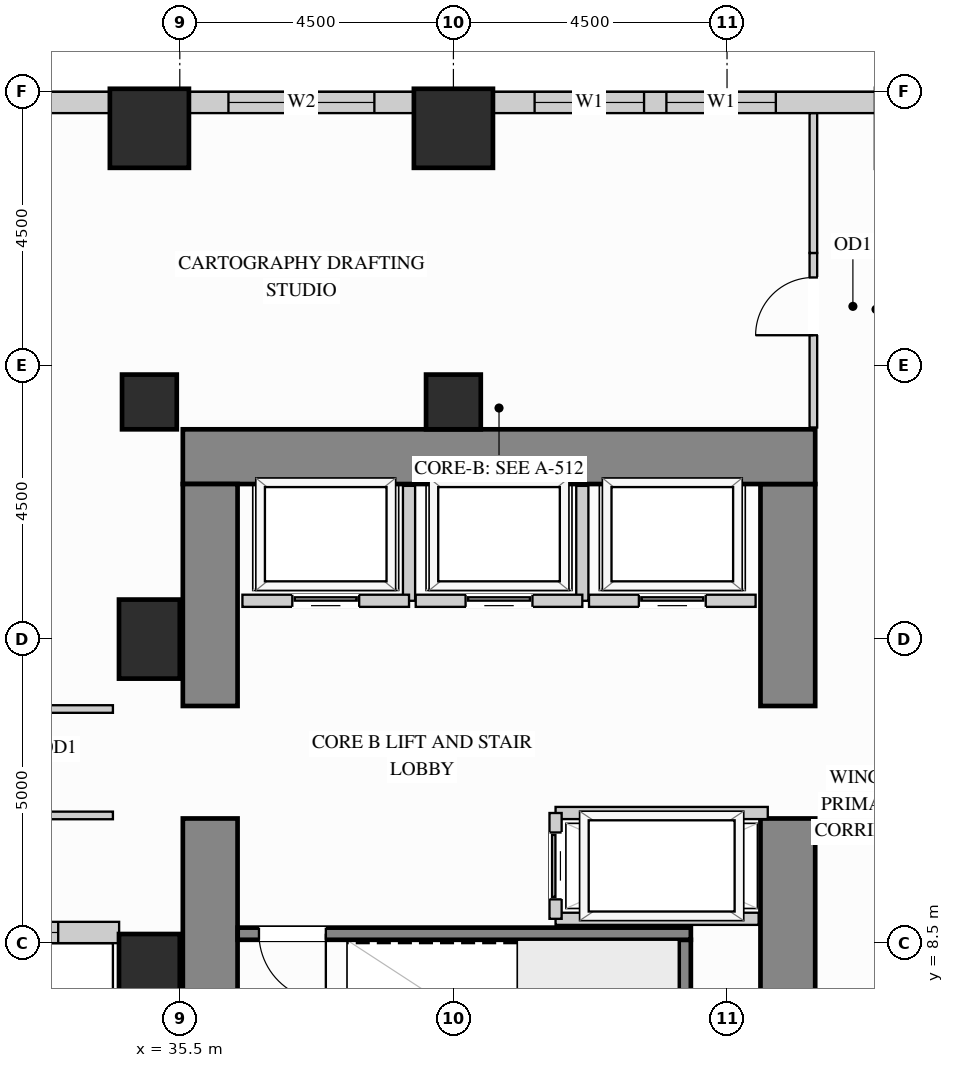
"""IFC4 building model, lengths in metres.
Left out: names, types, materials, properties, quantities, classifications, styles, units other than length and angle.
Written with IfcOpenShell. Run it as: python <this file> out.ifc"""

import sys

from ifc_helpers import new_model, si_unit, direction, frame, frame_2d, origin, origin_2d, place, context, subcontext, project, spatial, rectangle, extrude, source, transform, mapped, element, fill, save


model = new_model("IFC4")
c1 = context("Model", 3, precision=1e-05, world=origin(), true_north=direction((0.0, 1.0)))
c2 = subcontext(c1, "Body", "Model", "MODEL_VIEW")
j1 = project(units=[si_unit("LENGTHUNIT", "METRE"), si_unit("PLANEANGLEUNIT", "RADIAN")], contexts=[c1])
p1 = place(None, origin())
s1 = spatial("IfcSite", under=j1, at=p1, CompositionType="ELEMENT")
p2 = place(p1, origin())
s2 = spatial("IfcBuilding", under=s1, at=p2, CompositionType="ELEMENT")
p3 = place(p2, frame((0.0, 0.0, 26.1)))
s3 = spatial("IfcBuildingStorey", under=s2, at=p3, CompositionType="ELEMENT", Elevation=26.1)
m1 = source(origin(), c2, "Body", "SweptSolid", [
    extrude(rectangle(XDim=0.9, YDim=0.9, at=origin_2d()), origin(), (0.0, 0.0, 1.0), 3.38),
])
for number, where, z_axis, x_axis in (
    (1, (35.0, 17.4, 0.0), (0.0, 0.0, 1.0), (1.0, 0.0, 0.0)),
    (2, (40.0, 17.4, 0.0), (0.0, 0.0, 1.0), (1.0, 0.0, 0.0)),
):
    element("IfcColumn", number, at=place(p3, frame(where, z_axis=z_axis, x_axis=x_axis)), inside=s3, PredefinedType="COLUMN", context=c2, shape_type="MappedRepresentation", body=[
        mapped(m1, transform((0.0, 0.0, 0.0), x_axis=(1.0, 0.0, 0.0), y_axis=(0.0, 1.0, 0.0), z_axis=(0.0, 0.0, 1.0))),
    ])
m2 = source(origin(), c2, "Body", "SweptSolid", [
    extrude(rectangle(XDim=1.0, YDim=1.3, at=origin_2d()), origin(), (0.0, 0.0, 1.0), 3.38),
])
for number, where, z_axis, x_axis in (
    (3, (35.0, 13.5, 0.0), (0.0, 0.0, 1.0), (1.0, 0.0, 0.0)),
    (4, (35.0, 8.0, 0.0), (0.0, 0.0, 1.0), (1.0, 0.0, 0.0)),
):
    element("IfcColumn", number, at=place(p3, frame(where, z_axis=z_axis, x_axis=x_axis)), inside=s3, PredefinedType="COLUMN", context=c2, shape_type="MappedRepresentation", body=[
        mapped(m2, transform((0.0, 0.0, 0.0), x_axis=(1.0, 0.0, 0.0), y_axis=(0.0, 1.0, 0.0), z_axis=(0.0, 0.0, 1.0))),
    ])
m3 = source(origin(), c2, "Body", "SweptSolid", [
    extrude(rectangle(XDim=1.3, YDim=1.3, at=origin_2d()), origin(), (0.0, 0.0, 1.0), 3.38),
])
for number, where, z_axis, x_axis in (
    (5, (35.0, 21.9, 0.0), (0.0, 0.0, 1.0), (1.0, 0.0, 0.0)),
    (6, (40.0, 21.9, 0.0), (0.0, 0.0, 1.0), (1.0, 0.0, 0.0)),
):
    element("IfcColumn", number, at=place(p3, frame(where, z_axis=z_axis, x_axis=x_axis)), inside=s3, PredefinedType="COLUMN", context=c2, shape_type="MappedRepresentation", body=[
        mapped(m3, transform((0.0, 0.0, 0.0), x_axis=(1.0, 0.0, 0.0), y_axis=(0.0, 1.0, 0.0), z_axis=(0.0, 0.0, 1.0))),
    ])
m4 = source(origin(), c2, "Body", "SweptSolid", [
    extrude(rectangle(XDim=5.6, YDim=0.9, at=frame_2d((2.8, 0.0))), origin(), (0.0, 0.0, 1.0), 3.38),
])
p4 = place(p3, frame((45.5, 4.95, 0.0), z_axis=(0.0, 0.0, 1.0), x_axis=(0.0, 1.0, 0.0)))
e7 = element("IfcWall", 7, at=p4, inside=s3, PredefinedType="SHEAR", context=c2, shape_type="MappedRepresentation", body=[
    mapped(m4, transform((0.0, 0.0, 0.0), x_axis=(1.0, 0.0, 0.0), y_axis=(0.0, 1.0, 0.0), z_axis=(0.0, 0.0, 1.0))),
])
m5 = source(origin(), c2, "Body", "SweptSolid", [
    extrude(rectangle(XDim=3.65, YDim=0.9, at=frame_2d((1.825, 0.0))), origin(), (0.0, 0.0, 1.0), 3.38),
])
p5 = place(p3, frame((45.5, 12.4, 0.0), z_axis=(0.0, 0.0, 1.0), x_axis=(0.0, 1.0, 0.0)))
e8 = element("IfcWall", 8, at=p5, inside=s3, PredefinedType="SHEAR", context=c2, shape_type="MappedRepresentation", body=[
    mapped(m5, transform((0.0, 0.0, 0.0), x_axis=(1.0, 0.0, 0.0), y_axis=(0.0, 1.0, 0.0), z_axis=(0.0, 0.0, 1.0))),
])
m6 = source(origin(), c2, "Body", "SweptSolid", [
    extrude(rectangle(XDim=10.4, YDim=0.9, at=frame_2d((5.2, 0.0))), origin(), (0.0, 0.0, 1.0), 3.38),
])
p6 = place(p3, frame((35.55, 16.5, 0.0), z_axis=(0.0, 0.0, 1.0), x_axis=(1.0, 0.0, 0.0)))
e9 = element("IfcWall", 9, at=p6, inside=s3, PredefinedType="SHEAR", context=c2, shape_type="MappedRepresentation", body=[
    mapped(m6, transform((0.0, 0.0, 0.0), x_axis=(1.0, 0.0, 0.0), y_axis=(0.0, 1.0, 0.0), z_axis=(0.0, 0.0, 1.0))),
])
p7 = place(p3, frame((36.0, 4.95, 0.0), z_axis=(0.0, 0.0, 1.0), x_axis=(0.0, 1.0, 0.0)))
e10 = element("IfcWall", 10, at=p7, inside=s3, PredefinedType="SHEAR", context=c2, shape_type="MappedRepresentation", body=[
    mapped(m4, transform((0.0, 0.0, 0.0), x_axis=(1.0, 0.0, 0.0), y_axis=(0.0, 1.0, 0.0), z_axis=(0.0, 0.0, 1.0))),
])
p8 = place(p3, frame((36.0, 12.4, 0.0), z_axis=(0.0, 0.0, 1.0), x_axis=(0.0, 1.0, 0.0)))
e11 = element("IfcWall", 11, at=p8, inside=s3, PredefinedType="SHEAR", context=c2, shape_type="MappedRepresentation", body=[
    mapped(m5, transform((0.0, 0.0, 0.0), x_axis=(1.0, 0.0, 0.0), y_axis=(0.0, 1.0, 0.0), z_axis=(0.0, 0.0, 1.0))),
])
p9 = place(p3, frame((30.998, 8.675, 0.0), z_axis=(0.0, 0.0, 1.0), x_axis=(1.0, 0.0, 0.0)))
e12 = element("IfcWall", 12, at=p9, inside=s3, PredefinedType="SOLIDWALL", context=c2, shape_type="SweptSolid", body=[
    extrude(rectangle(XDim=3.504, YDim=0.35, at=frame_2d((1.752, 0.0))), origin(), (0.0, 0.0, 1.0), 3.365),
])
p10 = place(p9, frame((1.002, 0.0, 0.78)))
e13 = element("IfcOpeningElement", 13, at=p10, cuts=e12, PredefinedType="OPENING", context=c2, shape_type="SweptSolid", body=[
    extrude(rectangle(XDim=1.5, YDim=2.0, at=frame_2d((0.75, 1.0))), frame((0.0, 0.185, 0.0), z_axis=(0.0, -1.0, 0.0), x_axis=(1.0, 0.0, 0.0)), (0.0, 0.0, 1.0), 0.37),
])
p11 = place(p3, frame((46.952, 22.325, 0.0), z_axis=(0.0, 0.0, 1.0), x_axis=(-1.0, 0.0, 0.0)))
e14 = element("IfcWall", 14, at=p11, inside=s3, PredefinedType="SOLIDWALL", context=c2, shape_type="SweptSolid", body=[
    extrude(rectangle(XDim=6.304, YDim=0.35, at=frame_2d((3.152, 0.0))), origin(), (0.0, 0.0, 1.0), 2.51),
])
p12 = place(p11, frame((1.649, 0.0, 0.78)))
e15 = element("IfcOpeningElement", 15, at=p12, cuts=e14, PredefinedType="OPENING", context=c2, shape_type="SweptSolid", body=[
    extrude(rectangle(XDim=1.8, YDim=1.55, at=frame_2d((0.9, 0.775))), frame((0.0, 0.185, 0.0), z_axis=(0.0, -1.0, 0.0), x_axis=(1.0, 0.0, 0.0)), (0.0, 0.0, 1.0), 0.37),
])
p13 = place(p11, frame((3.817, 0.0, 0.78)))
e16 = element("IfcOpeningElement", 16, at=p13, cuts=e14, PredefinedType="OPENING", context=c2, shape_type="SweptSolid", body=[
    extrude(rectangle(XDim=1.8, YDim=1.55, at=frame_2d((0.9, 0.775))), frame((0.0, 0.185, 0.0), z_axis=(0.0, -1.0, 0.0), x_axis=(1.0, 0.0, 0.0)), (0.0, 0.0, 1.0), 0.37),
])
p14 = place(p3, frame((39.352, 22.325, 0.0), z_axis=(0.0, 0.0, 1.0), x_axis=(-1.0, 0.0, 0.0)))
e17 = element("IfcWall", 17, at=p14, inside=s3, PredefinedType="SOLIDWALL", context=c2, shape_type="SweptSolid", body=[
    extrude(rectangle(XDim=3.704, YDim=0.35, at=frame_2d((1.852, 0.0))), origin(), (0.0, 0.0, 1.0), 2.51),
])
p15 = place(p14, frame((0.652, 0.0, 0.78)))
e18 = element("IfcOpeningElement", 18, at=p15, cuts=e17, PredefinedType="OPENING", context=c2, shape_type="SweptSolid", body=[
    extrude(rectangle(XDim=2.4, YDim=1.55, at=frame_2d((1.2, 0.775))), frame((0.0, 0.185, 0.0), z_axis=(0.0, -1.0, 0.0), x_axis=(1.0, 0.0, 0.0)), (0.0, 0.0, 1.0), 0.37),
])
p16 = place(p3, frame((34.352, 22.325, 0.0), z_axis=(0.0, 0.0, 1.0), x_axis=(-1.0, 0.0, 0.0)))
e19 = element("IfcWall", 19, at=p16, inside=s3, PredefinedType="SOLIDWALL", context=c2, shape_type="SweptSolid", body=[
    extrude(rectangle(XDim=14.854, YDim=0.35, at=frame_2d((7.427, 0.0))), origin(), (0.0, 0.0, 1.0), 3.365),
])
p17 = place(p16, frame((4.058, 0.0, 0.78)))
e20 = element("IfcOpeningElement", 20, at=p17, cuts=e19, PredefinedType="OPENING", context=c2, shape_type="SweptSolid", body=[
    extrude(rectangle(XDim=1.5, YDim=2.0, at=frame_2d((0.75, 1.0))), frame((0.0, 0.185, 0.0), z_axis=(0.0, -1.0, 0.0), x_axis=(1.0, 0.0, 0.0)), (0.0, 0.0, 1.0), 0.37),
])
p18 = place(p16, frame((9.296, 0.0, 0.78)))
e21 = element("IfcOpeningElement", 21, at=p18, cuts=e19, PredefinedType="OPENING", context=c2, shape_type="SweptSolid", body=[
    extrude(rectangle(XDim=1.5, YDim=2.0, at=frame_2d((0.75, 1.0))), frame((0.0, 0.185, 0.0), z_axis=(0.0, -1.0, 0.0), x_axis=(1.0, 0.0, 0.0)), (0.0, 0.0, 1.0), 0.37),
])
p19 = place(p3, frame((45.92, 16.98, 0.0), z_axis=(0.0, 0.0, 1.0), x_axis=(0.0, 1.0, 0.0)))
e22 = element("IfcWall", 22, at=p19, inside=s3, PredefinedType="PARTITIONING", context=c2, shape_type="SweptSolid", body=[
    extrude(rectangle(XDim=2.87, YDim=0.125, at=frame_2d((1.435, 0.0))), origin(), (0.0, 0.0, 1.0), 3.365),
])
p20 = place(p19, frame((1.517, 0.0, 0.0)))
e23 = element("IfcOpeningElement", 23, at=p20, cuts=e22, PredefinedType="OPENING", context=c2, shape_type="SweptSolid", body=[
    extrude(rectangle(XDim=0.95, YDim=2.15, at=frame_2d((0.475, 1.075))), frame((0.0, 0.073, 0.0), z_axis=(0.0, -1.0, 0.0), x_axis=(1.0, 0.0, 0.0)), (0.0, 0.0, 1.0), 0.145),
])
m7 = source(origin(), c2, "Body", "SweptSolid", [
    extrude(rectangle(XDim=2.298, YDim=0.125, at=frame_2d((1.149, 0.0))), origin(), (0.0, 0.0, 1.0), 3.365),
])
p21 = place(p3, frame((45.92, 19.85, 0.0), z_axis=(0.0, 0.0, 1.0), x_axis=(0.0, 1.0, 0.0)))
e24 = element("IfcWall", 24, at=p21, inside=s3, PredefinedType="PARTITIONING", context=c2, shape_type="MappedRepresentation", body=[
    mapped(m7, transform((0.0, 0.0, 0.0), x_axis=(1.0, 0.0, 0.0), y_axis=(0.0, 1.0, 0.0), z_axis=(0.0, 0.0, 1.0))),
])
p22 = place(p3, frame((29.85, 12.35, 0.0), z_axis=(0.0, 0.0, 1.0), x_axis=(1.0, 0.0, 0.0)))
e25 = element("IfcWall", 25, at=p22, inside=s3, PredefinedType="PARTITIONING", context=c2, shape_type="SweptSolid", body=[
    extrude(rectangle(XDim=4.55, YDim=0.125, at=frame_2d((2.275, 0.0))), origin(), (0.0, 0.0, 1.0), 3.365),
])
p23 = place(p22, frame((1.8, 0.0, 0.0)))
e26 = element("IfcOpeningElement", 26, at=p23, cuts=e25, PredefinedType="OPENING", context=c2, shape_type="SweptSolid", body=[
    extrude(rectangle(XDim=0.95, YDim=2.15, at=frame_2d((0.475, 1.075))), frame((0.0, 0.073, 0.0), z_axis=(0.0, -1.0, 0.0), x_axis=(1.0, 0.0, 0.0)), (0.0, 0.0, 1.0), 0.145),
])
p24 = place(p3, frame((26.95, 10.6, 0.0), z_axis=(0.0, 0.0, 1.0), x_axis=(1.0, 0.0, 0.0)))
e27 = element("IfcWall", 27, at=p24, inside=s3, PredefinedType="PARTITIONING", context=c2, shape_type="SweptSolid", body=[
    extrude(rectangle(XDim=7.45, YDim=0.125, at=frame_2d((3.725, 0.0))), origin(), (0.0, 0.0, 1.0), 3.365),
])
p25 = place(p24, frame((4.683, 0.0, 0.0)))
e28 = element("IfcOpeningElement", 28, at=p25, cuts=e27, PredefinedType="OPENING", context=c2, shape_type="SweptSolid", body=[
    extrude(rectangle(XDim=0.95, YDim=2.15, at=frame_2d((0.475, 1.075))), frame((0.0, 0.073, 0.0), z_axis=(0.0, -1.0, 0.0), x_axis=(1.0, 0.0, 0.0)), (0.0, 0.0, 1.0), 0.145),
])
m8 = source(origin(), c2, "Body", "SweptSolid", [
    extrude(rectangle(XDim=1.89, YDim=0.2, at=frame_2d((0.945, 0.0))), origin(), (0.0, 0.0, 1.0), 3.365),
])
p26 = place(p3, frame((39.27, 14.13, 0.0), z_axis=(0.0, 0.0, 1.0), x_axis=(0.0, 1.0, 0.0)))
e29 = element("IfcWall", 29, at=p26, inside=s3, PredefinedType="PARTITIONING", context=c2, shape_type="MappedRepresentation", body=[
    mapped(m8, transform((0.0, 0.0, 0.0), x_axis=(1.0, 0.0, 0.0), y_axis=(0.0, 1.0, 0.0), z_axis=(0.0, 0.0, 1.0))),
])
p27 = place(p3, frame((36.53, 14.13, 0.0), z_axis=(0.0, 0.0, 1.0), x_axis=(1.0, 0.0, 0.0)))
e30 = element("IfcWall", 30, at=p27, inside=s3, PredefinedType="PARTITIONING", context=c2, shape_type="SweptSolid", body=[
    extrude(rectangle(XDim=2.74, YDim=0.2, at=frame_2d((1.37, 0.0))), origin(), (0.0, 0.0, 1.0), 3.365),
])
p28 = place(p27, frame((0.82, 0.0, 0.0)))
e31 = element("IfcOpeningElement", 31, at=p28, cuts=e30, PredefinedType="OPENING", context=c2, shape_type="SweptSolid", body=[
    extrude(rectangle(XDim=1.1, YDim=2.2, at=frame_2d((0.55, 1.1))), frame((0.0, 0.11, 0.0), z_axis=(0.0, -1.0, 0.0), x_axis=(1.0, 0.0, 0.0)), (0.0, 0.0, 1.0), 0.22),
])
p29 = place(p3, frame((42.12, 14.13, 0.0), z_axis=(0.0, 0.0, 1.0), x_axis=(0.0, 1.0, 0.0)))
e32 = element("IfcWall", 32, at=p29, inside=s3, PredefinedType="PARTITIONING", context=c2, shape_type="MappedRepresentation", body=[
    mapped(m8, transform((0.0, 0.0, 0.0), x_axis=(1.0, 0.0, 0.0), y_axis=(0.0, 1.0, 0.0), z_axis=(0.0, 0.0, 1.0))),
])
p30 = place(p3, frame((39.38, 14.13, 0.0), z_axis=(0.0, 0.0, 1.0), x_axis=(1.0, 0.0, 0.0)))
e33 = element("IfcWall", 33, at=p30, inside=s3, PredefinedType="PARTITIONING", context=c2, shape_type="SweptSolid", body=[
    extrude(rectangle(XDim=2.74, YDim=0.2, at=frame_2d((1.37, 0.0))), origin(), (0.0, 0.0, 1.0), 3.365),
])
p31 = place(p30, frame((0.82, 0.0, 0.0)))
e34 = element("IfcOpeningElement", 34, at=p31, cuts=e33, PredefinedType="OPENING", context=c2, shape_type="SweptSolid", body=[
    extrude(rectangle(XDim=1.1, YDim=2.2, at=frame_2d((0.55, 1.1))), frame((0.0, 0.11, 0.0), z_axis=(0.0, -1.0, 0.0), x_axis=(1.0, 0.0, 0.0)), (0.0, 0.0, 1.0), 0.22),
])
p32 = place(p3, frame((42.23, 14.13, 0.0), z_axis=(0.0, 0.0, 1.0), x_axis=(1.0, 0.0, 0.0)))
e35 = element("IfcWall", 35, at=p32, inside=s3, PredefinedType="PARTITIONING", context=c2, shape_type="SweptSolid", body=[
    extrude(rectangle(XDim=2.74, YDim=0.2, at=frame_2d((1.37, 0.0))), origin(), (0.0, 0.0, 1.0), 3.365),
])
p33 = place(p32, frame((0.82, 0.0, 0.0)))
e36 = element("IfcOpeningElement", 36, at=p33, cuts=e35, PredefinedType="OPENING", context=c2, shape_type="SweptSolid", body=[
    extrude(rectangle(XDim=1.1, YDim=2.2, at=frame_2d((0.55, 1.1))), frame((0.0, 0.11, 0.0), z_axis=(0.0, -1.0, 0.0), x_axis=(1.0, 0.0, 0.0)), (0.0, 0.0, 1.0), 0.22),
])
m9 = source(origin(), c2, "Body", "SweptSolid", [
    extrude(rectangle(XDim=3.49, YDim=0.2, at=frame_2d((1.745, 0.0))), origin(), (0.0, 0.0, 1.0), 3.365),
])
p34 = place(p3, frame((41.68, 10.64, 0.0), z_axis=(0.0, 0.0, 1.0), x_axis=(1.0, 0.0, 0.0)))
e37 = element("IfcWall", 37, at=p34, inside=s3, PredefinedType="PARTITIONING", context=c2, shape_type="MappedRepresentation", body=[
    mapped(m9, transform((0.0, 0.0, 0.0), x_axis=(1.0, 0.0, 0.0), y_axis=(0.0, 1.0, 0.0), z_axis=(0.0, 0.0, 1.0))),
])
m10 = source(origin(), c2, "Body", "SweptSolid", [
    extrude(rectangle(XDim=3.34, YDim=0.2, at=frame_2d((1.67, 0.0))), origin(), (0.0, 0.0, 1.0), 3.365),
])
p35 = place(p3, frame((41.68, 8.9, 0.0), z_axis=(0.0, 0.0, 1.0), x_axis=(1.0, 0.0, 0.0)))
e38 = element("IfcWall", 38, at=p35, inside=s3, PredefinedType="PARTITIONING", context=c2, shape_type="MappedRepresentation", body=[
    mapped(m10, transform((0.0, 0.0, 0.0), x_axis=(1.0, 0.0, 0.0), y_axis=(0.0, 1.0, 0.0), z_axis=(0.0, 0.0, 1.0))),
])
p36 = place(p3, frame((41.68, 8.9, 0.0), z_axis=(0.0, 0.0, 1.0), x_axis=(0.0, 1.0, 0.0)))
e39 = element("IfcWall", 39, at=p36, inside=s3, PredefinedType="PARTITIONING", context=c2, shape_type="SweptSolid", body=[
    extrude(rectangle(XDim=1.74, YDim=0.2, at=frame_2d((0.87, 0.0))), origin(), (0.0, 0.0, 1.0), 3.365),
])
p37 = place(p36, frame((0.32, 0.0, 0.0)))
e40 = element("IfcOpeningElement", 40, at=p37, cuts=e39, PredefinedType="OPENING", context=c2, shape_type="SweptSolid", body=[
    extrude(rectangle(XDim=1.1, YDim=2.2, at=frame_2d((0.55, 1.1))), frame((0.0, 0.11, 0.0), z_axis=(0.0, -1.0, 0.0), x_axis=(1.0, 0.0, 0.0)), (0.0, 0.0, 1.0), 0.22),
])
m11 = source(origin(), c2, "Body", "SweptSolid", [
    extrude(rectangle(XDim=3.603, YDim=0.2, at=frame_2d((1.802, 0.0))), origin(), (0.0, 0.0, 1.0), 3.38),
])
p38 = place(p3, frame((43.805, 4.952, 0.0), z_axis=(0.0, 0.0, 1.0), x_axis=(0.0, 1.0, 0.0)))
e41 = element("IfcWall", 41, at=p38, inside=s3, PredefinedType="SHEAR", context=c2, shape_type="MappedRepresentation", body=[
    mapped(m11, transform((0.0, 0.0, 0.0), x_axis=(1.0, 0.0, 0.0), y_axis=(0.0, 1.0, 0.0), z_axis=(0.0, 0.0, 1.0))),
])
p39 = place(p3, frame((36.452, 8.655, 0.0), z_axis=(0.0, 0.0, 1.0), x_axis=(1.0, 0.0, 0.0)))
e42 = element("IfcWall", 42, at=p39, inside=s3, PredefinedType="SHEAR", context=c2, shape_type="SweptSolid", body=[
    extrude(rectangle(XDim=7.453, YDim=0.2, at=frame_2d((3.727, 0.0))), origin(), (0.0, 0.0, 1.0), 3.38),
])
p40 = place(p39, frame((0.35, 0.0, 0.0)))
e43 = element("IfcOpeningElement", 43, at=p40, cuts=e42, PredefinedType="OPENING", context=c2, shape_type="SweptSolid", body=[
    extrude(rectangle(XDim=1.1, YDim=2.15, at=frame_2d((0.55, 1.075))), frame((0.0, 0.11, 0.0), z_axis=(0.0, -1.0, 0.0), x_axis=(1.0, 0.0, 0.0)), (0.0, 0.0, 1.0), 0.22),
])
m12 = source(origin(), c2, "Body", "SweptSolid", [
    extrude(rectangle(XDim=1.1, YDim=2.2, at=frame_2d((0.55, 1.1))), frame((0.0, 0.025, 0.0), z_axis=(0.0, -1.0, 0.0), x_axis=(1.0, 0.0, 0.0)), (0.0, 0.0, 1.0), 0.05),
])
p41 = place(p28, origin())
e44 = element("IfcDoor", 44, at=p41, inside=s3, OperationType="SLIDING_TO_LEFT", PredefinedType="DOOR", context=c2, shape_type="MappedRepresentation", body=[
    mapped(m12, transform((0.0, 0.0, 0.0), x_axis=(1.0, 0.0, 0.0), y_axis=(0.0, 1.0, 0.0), z_axis=(0.0, 0.0, 1.0))),
])
fill(e31, e44)
p42 = place(p31, origin())
e45 = element("IfcDoor", 45, at=p42, inside=s3, OperationType="SLIDING_TO_LEFT", PredefinedType="DOOR", context=c2, shape_type="MappedRepresentation", body=[
    mapped(m12, transform((0.0, 0.0, 0.0), x_axis=(1.0, 0.0, 0.0), y_axis=(0.0, 1.0, 0.0), z_axis=(0.0, 0.0, 1.0))),
])
fill(e34, e45)
p43 = place(p33, origin())
e46 = element("IfcDoor", 46, at=p43, inside=s3, OperationType="SLIDING_TO_LEFT", PredefinedType="DOOR", context=c2, shape_type="MappedRepresentation", body=[
    mapped(m12, transform((0.0, 0.0, 0.0), x_axis=(1.0, 0.0, 0.0), y_axis=(0.0, 1.0, 0.0), z_axis=(0.0, 0.0, 1.0))),
])
fill(e36, e46)
p44 = place(p37, origin())
e47 = element("IfcDoor", 47, at=p44, inside=s3, OperationType="SLIDING_TO_LEFT", PredefinedType="DOOR", context=c2, shape_type="MappedRepresentation", body=[
    mapped(m12, transform((0.0, 0.0, 0.0), x_axis=(1.0, 0.0, 0.0), y_axis=(0.0, 1.0, 0.0), z_axis=(0.0, 0.0, 1.0))),
])
fill(e40, e47)
m13 = source(origin(), c2, "Body", "SweptSolid", [
    extrude(rectangle(XDim=0.95, YDim=2.15, at=frame_2d((0.475, 1.075))), frame((0.0, 0.025, 0.0), z_axis=(0.0, -1.0, 0.0), x_axis=(1.0, 0.0, 0.0)), (0.0, 0.0, 1.0), 0.05),
])
p45 = place(p20, origin())
e48 = element("IfcDoor", 48, at=p45, inside=s3, OperationType="SINGLE_SWING_LEFT", PredefinedType="DOOR", context=c2, shape_type="MappedRepresentation", body=[
    mapped(m13, transform((0.0, 0.0, 0.0), x_axis=(1.0, 0.0, 0.0), y_axis=(0.0, 1.0, 0.0), z_axis=(0.0, 0.0, 1.0))),
])
fill(e23, e48)
m14 = source(origin(), c2, "Body", "SweptSolid", [
    extrude(rectangle(XDim=1.1, YDim=2.15, at=frame_2d((0.55, 1.075))), frame((0.0, 0.025, 0.0), z_axis=(0.0, -1.0, 0.0), x_axis=(1.0, 0.0, 0.0)), (0.0, 0.0, 1.0), 0.05),
])
p46 = place(p40, origin())
e49 = element("IfcDoor", 49, at=p46, inside=s3, OperationType="SINGLE_SWING_RIGHT", PredefinedType="DOOR", context=c2, shape_type="MappedRepresentation", body=[
    mapped(m14, transform((0.0, 0.0, 0.0), x_axis=(1.0, 0.0, 0.0), y_axis=(0.0, 1.0, 0.0), z_axis=(0.0, 0.0, 1.0))),
])
fill(e43, e49)
m15 = source(origin(), c2, "Body", "SweptSolid", [
    extrude(rectangle(XDim=1.8, YDim=1.55, at=frame_2d((0.9, 0.775))), frame((0.0, 0.03, 0.0), z_axis=(0.0, -1.0, 0.0), x_axis=(1.0, 0.0, 0.0)), (0.0, 0.0, 1.0), 0.06),
])
p47 = place(p12, origin())
e50 = element("IfcWindow", 50, at=p47, inside=s3, PartitioningType="SINGLE_PANEL", PredefinedType="WINDOW", context=c2, shape_type="MappedRepresentation", body=[
    mapped(m15, transform((0.0, 0.0, 0.0), x_axis=(1.0, 0.0, 0.0), y_axis=(0.0, 1.0, 0.0), z_axis=(0.0, 0.0, 1.0))),
])
fill(e15, e50)
p48 = place(p13, origin())
e51 = element("IfcWindow", 51, at=p48, inside=s3, PartitioningType="SINGLE_PANEL", PredefinedType="WINDOW", context=c2, shape_type="MappedRepresentation", body=[
    mapped(m15, transform((0.0, 0.0, 0.0), x_axis=(1.0, 0.0, 0.0), y_axis=(0.0, 1.0, 0.0), z_axis=(0.0, 0.0, 1.0))),
])
fill(e16, e51)
m16 = source(origin(), c2, "Body", "SweptSolid", [
    extrude(rectangle(XDim=2.4, YDim=1.55, at=frame_2d((1.2, 0.775))), frame((0.0, 0.03, 0.0), z_axis=(0.0, -1.0, 0.0), x_axis=(1.0, 0.0, 0.0)), (0.0, 0.0, 1.0), 0.06),
])
p49 = place(p15, origin())
e52 = element("IfcWindow", 52, at=p49, inside=s3, PartitioningType="SINGLE_PANEL", PredefinedType="WINDOW", context=c2, shape_type="MappedRepresentation", body=[
    mapped(m16, transform((0.0, 0.0, 0.0), x_axis=(1.0, 0.0, 0.0), y_axis=(0.0, 1.0, 0.0), z_axis=(0.0, 0.0, 1.0))),
])
fill(e18, e52)
m17 = source(origin(), c2, "Body", "SweptSolid", [
    extrude(rectangle(XDim=1.5, YDim=2.0, at=frame_2d((0.75, 1.0))), frame((0.0, 0.03, 0.0), z_axis=(0.0, -1.0, 0.0), x_axis=(1.0, 0.0, 0.0)), (0.0, 0.0, 1.0), 0.06),
])
p50 = place(p10, origin())
e53 = element("IfcWindow", 53, at=p50, inside=s3, PartitioningType="SINGLE_PANEL", PredefinedType="WINDOW", context=c2, shape_type="MappedRepresentation", body=[
    mapped(m17, transform((0.0, 0.0, 0.0), x_axis=(1.0, 0.0, 0.0), y_axis=(0.0, 1.0, 0.0), z_axis=(0.0, 0.0, 1.0))),
])
fill(e13, e53)
save(model, sys.argv[1])
